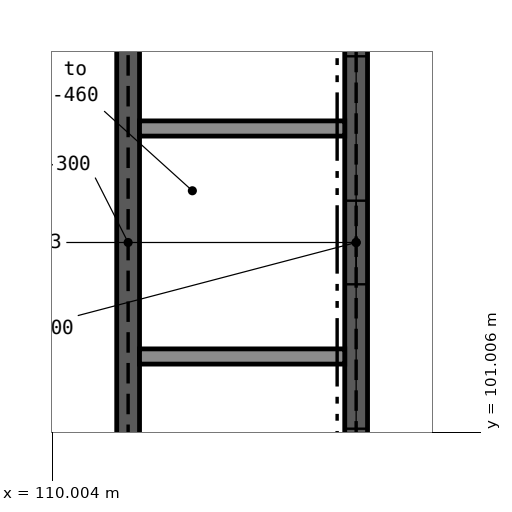
"""IFC4 building model, lengths in metres.
Left out: names, types, materials, properties, quantities, classifications, styles, units other than length and angle.
Written with IfcOpenShell. Run it as: python <this file> out.ifc"""

import sys

from ifc_helpers import new_model, si_unit, direction, frame, frame_2d, origin, place, context, subcontext, project, spatial, rectangle, extrude, element, fill, save


model = new_model("IFC4")
c1 = context("Model", 3, precision=1e-05, world=origin(), true_north=direction((0.0, 1.0)))
c2 = subcontext(c1, "Body", "Model", "MODEL_VIEW")
j1 = project(units=[si_unit("LENGTHUNIT", "METRE"), si_unit("PLANEANGLEUNIT", "RADIAN")], contexts=[c1])
p1 = place(None, origin())
s1 = spatial("IfcSite", under=j1, at=p1, CompositionType="ELEMENT")
p2 = place(p1, origin())
s2 = spatial("IfcBuilding", under=s1, at=p2, CompositionType="ELEMENT")
p3 = place(p2, frame((0.0, 0.0, 16.2)))
s3 = spatial("IfcBuildingStorey", under=s2, at=p3, CompositionType="ELEMENT", Elevation=16.2)
p4 = place(p3, frame((111.0, 99.15, 0.0), z_axis=(0.0, 0.0, 1.0), x_axis=(0.0, 1.0, 0.0)))
e1 = element("IfcWall", 1, at=p4, inside=s3, PredefinedType="SHEAR", context=c2, shape_type="SweptSolid", body=[
    extrude(rectangle(XDim=8.7, YDim=0.3, at=frame_2d((4.35, 0.0))), origin(), (0.0, 0.0, 1.0), 5.4),
])
p5 = place(p3, frame((114.0, 99.15, 0.0), z_axis=(0.0, 0.0, 1.0), x_axis=(0.0, 1.0, 0.0)))
e2 = element("IfcWall", 2, at=p5, inside=s3, PredefinedType="SHEAR", context=c2, shape_type="SweptSolid", body=[
    extrude(rectangle(XDim=8.7, YDim=0.3, at=frame_2d((4.35, 0.0))), origin(), (0.0, 0.0, 1.0), 5.4),
])
p6 = place(p5, frame((0.8, 0.0, 0.0)))
e3 = element("IfcOpeningElement", 3, at=p6, cuts=e2, PredefinedType="OPENING", context=c2, shape_type="SweptSolid", body=[
    extrude(rectangle(XDim=1.1, YDim=2.1, at=frame_2d((0.55, 1.05))), frame((0.0, 0.161, 0.0), z_axis=(0.0, -1.0, 0.0), x_axis=(1.0, 0.0, 0.0)), (0.0, 0.0, 1.0), 0.322),
])
p7 = place(p5, frame((3.8, 0.0, 0.0)))
e4 = element("IfcOpeningElement", 4, at=p7, cuts=e2, PredefinedType="OPENING", context=c2, shape_type="SweptSolid", body=[
    extrude(rectangle(XDim=1.1, YDim=2.1, at=frame_2d((0.55, 1.05))), frame((0.0, 0.161, 0.0), z_axis=(0.0, -1.0, 0.0), x_axis=(1.0, 0.0, 0.0)), (0.0, 0.0, 1.0), 0.322),
])
p8 = place(p5, frame((6.8, 0.0, 0.0)))
e5 = element("IfcOpeningElement", 5, at=p8, cuts=e2, PredefinedType="OPENING", context=c2, shape_type="SweptSolid", body=[
    extrude(rectangle(XDim=1.1, YDim=2.1, at=frame_2d((0.55, 1.05))), frame((0.0, 0.161, 0.0), z_axis=(0.0, -1.0, 0.0), x_axis=(1.0, 0.0, 0.0)), (0.0, 0.0, 1.0), 0.322),
])
for number, where, z_axis, x_axis in (
    (6, (111.15, 102.0, 0.0), (0.0, 0.0, 1.0), (1.0, 0.0, 0.0)),
    (7, (111.15, 105.0, 0.0), (0.0, 0.0, 1.0), (1.0, 0.0, 0.0)),
):
    element("IfcWall", number, at=place(p3, frame(where, z_axis=z_axis, x_axis=x_axis)), inside=s3, PredefinedType="SOLIDWALL", context=c2, shape_type="SweptSolid", body=[
        extrude(rectangle(XDim=2.7, YDim=0.2, at=frame_2d((1.35, 0.0))), origin(), (0.0, 0.0, 1.0), 5.4),
    ])
p9 = place(p6, origin())
e8 = element("IfcDoor", 8, at=p9, inside=s3, OperationType="DOUBLE_DOOR_SLIDING", PredefinedType="DOOR", context=c2, shape_type="SweptSolid", body=[
    extrude(rectangle(XDim=1.1, YDim=2.1, at=frame_2d((0.55, 1.05))), frame((0.0, 0.025, 0.0), z_axis=(0.0, -1.0, 0.0), x_axis=(1.0, 0.0, 0.0)), (0.0, 0.0, 1.0), 0.05),
])
fill(e3, e8)
p10 = place(p7, origin())
e9 = element("IfcDoor", 9, at=p10, inside=s3, OperationType="DOUBLE_DOOR_SLIDING", PredefinedType="DOOR", context=c2, shape_type="SweptSolid", body=[
    extrude(rectangle(XDim=1.1, YDim=2.1, at=frame_2d((0.55, 1.05))), frame((0.0, 0.025, 0.0), z_axis=(0.0, -1.0, 0.0), x_axis=(1.0, 0.0, 0.0)), (0.0, 0.0, 1.0), 0.05),
])
fill(e4, e9)
p11 = place(p8, origin())
e10 = element("IfcDoor", 10, at=p11, inside=s3, OperationType="DOUBLE_DOOR_SLIDING", PredefinedType="DOOR", context=c2, shape_type="SweptSolid", body=[
    extrude(rectangle(XDim=1.1, YDim=2.1, at=frame_2d((0.55, 1.05))), frame((0.0, 0.025, 0.0), z_axis=(0.0, -1.0, 0.0), x_axis=(1.0, 0.0, 0.0)), (0.0, 0.0, 1.0), 0.05),
])
fill(e5, e10)
save(model, sys.argv[1])
